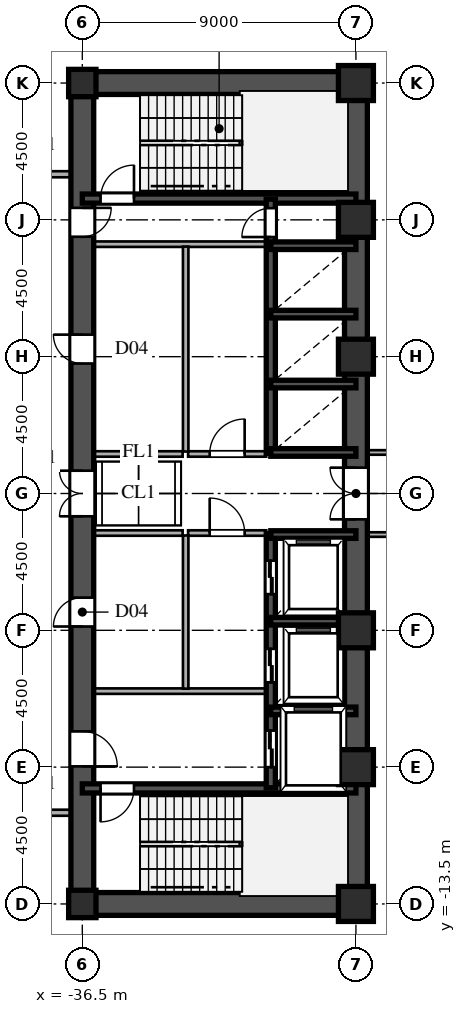
"""IFC4 building model, lengths in metres.
Left out: names, types, materials, properties, quantities, classifications, styles, units other than length and angle.
Written with IfcOpenShell. Run it as: python <this file> out.ifc"""

import sys

from ifc_helpers import new_model, si_unit, direction, frame, frame_2d, origin, origin_2d, place, context, subcontext, project, spatial, rectangle, hollow_rectangle, i_section, extrude, source, transform, mapped, element, fill, save


model = new_model("IFC4")
c1 = context("Model", 3, precision=1e-05, world=origin(), true_north=direction((0.0, 1.0)))
c2 = subcontext(c1, "Body", "Model", "MODEL_VIEW")
j1 = project(units=[si_unit("LENGTHUNIT", "METRE"), si_unit("PLANEANGLEUNIT", "RADIAN")], contexts=[c1])
p1 = place(None, origin())
s1 = spatial("IfcSite", under=j1, at=p1, CompositionType="ELEMENT")
p2 = place(p1, origin())
s2 = spatial("IfcBuilding", under=s1, at=p2, CompositionType="ELEMENT")
p3 = place(p2, frame((0.0, 0.0, 9.9)))
s3 = spatial("IfcBuildingStorey", under=s2, at=p3, CompositionType="ELEMENT", Elevation=9.9)
m1 = source(origin(), c2, "Body", "SweptSolid", [
    extrude(hollow_rectangle(XDim=1.15, YDim=1.15, WallThickness=0.048, at=origin_2d()), origin(), (0.0, 0.0, 1.0), 4.5),
])
for number, where, z_axis, x_axis in (
    (1, (-27.5, -13.5, 0.0), (0.0, 0.0, 1.0), (1.0, 0.0, 0.0)),
    (2, (-27.5, -9.0, 0.0), (0.0, 0.0, 1.0), (1.0, 0.0, 0.0)),
    (3, (-27.5, -4.5, 0.0), (0.0, 0.0, 1.0), (1.0, 0.0, 0.0)),
    (4, (-27.5, 4.5, 0.0), (0.0, 0.0, 1.0), (1.0, 0.0, 0.0)),
    (5, (-27.5, 9.0, 0.0), (0.0, 0.0, 1.0), (1.0, 0.0, 0.0)),
    (6, (-27.5, 13.5, 0.0), (0.0, 0.0, 1.0), (1.0, 0.0, 0.0)),
):
    element("IfcColumn", number, at=place(p3, frame(where, z_axis=z_axis, x_axis=x_axis)), inside=s3, PredefinedType="COLUMN", context=c2, shape_type="MappedRepresentation", body=[
        mapped(m1, transform((0.0, 0.0, 0.0), scale=1.0)),
    ])
m2 = source(origin(), c2, "Body", "SweptSolid", [
    extrude(i_section(OverallWidth=0.9, OverallDepth=0.9, WebThickness=0.036, FlangeThickness=0.055, at=origin_2d()), origin(), (0.0, 0.0, 1.0), 4.5),
])
for number, where, z_axis, x_axis in (
    (7, (-36.5, -13.5, 0.0), (0.0, 0.0, 1.0), (1.0, 0.0, 0.0)),
    (8, (-36.5, 13.5, 0.0), (0.0, 0.0, 1.0), (1.0, 0.0, 0.0)),
):
    element("IfcColumn", number, at=place(p3, frame(where, z_axis=z_axis, x_axis=x_axis)), inside=s3, PredefinedType="COLUMN", context=c2, shape_type="MappedRepresentation", body=[
        mapped(m2, transform((0.0, 0.0, 0.0), scale=1.0)),
    ])
for number, where, z_axis, x_axis in (
    (9, (-27.5, -13.5, 0.0), (0.0, 0.0, 1.0), (0.0, 1.0, 0.0)),
    (10, (-27.5, 1.3, 0.0), (0.0, 0.0, 1.0), (0.0, 1.0, 0.0)),
):
    element("IfcWall", number, at=place(p3, frame(where, z_axis=z_axis, x_axis=x_axis)), inside=s3, PredefinedType="SHEAR", context=c2, shape_type="SweptSolid", body=[
        extrude(rectangle(XDim=12.2, YDim=0.75, at=frame_2d((6.1, 0.0))), origin(), (0.0, 0.0, 1.0), 4.22),
    ])
p4 = place(p3, frame((-27.5, -1.3, 0.0), z_axis=(0.0, 0.0, 1.0), x_axis=(0.0, 1.0, 0.0)))
e11 = element("IfcWall", 11, at=p4, inside=s3, PredefinedType="SHEAR", context=c2, shape_type="SweptSolid", body=[
    extrude(rectangle(XDim=2.6, YDim=0.75, at=frame_2d((1.3, 0.0))), origin(), (0.0, 0.0, 1.0), 4.22),
])
p5 = place(p4, frame((0.45, 0.0, 0.0)))
e12 = element("IfcOpeningElement", 12, at=p5, cuts=e11, PredefinedType="OPENING", context=c2, shape_type="SweptSolid", body=[
    extrude(rectangle(XDim=1.7, YDim=2.35, at=frame_2d((0.85, 1.175))), frame((0.0, 0.385, 0.0), z_axis=(0.0, -1.0, 0.0), x_axis=(1.0, 0.0, 0.0)), (0.0, 0.0, 1.0), 0.77),
])
for number, where, z_axis, x_axis in (
    (13, (-36.5, -13.5, 0.0), (0.0, 0.0, 1.0), (1.0, 0.0, 0.0)),
    (14, (-36.5, 13.5, 0.0), (0.0, 0.0, 1.0), (1.0, 0.0, 0.0)),
):
    element("IfcWall", number, at=place(p3, frame(where, z_axis=z_axis, x_axis=x_axis)), inside=s3, PredefinedType="SHEAR", context=c2, shape_type="SweptSolid", body=[
        extrude(rectangle(XDim=9.0, YDim=0.75, at=frame_2d((4.5, 0.0))), origin(), (0.0, 0.0, 1.0), 4.22),
    ])
p6 = place(p3, frame((-36.5, -13.65, 0.0), z_axis=(0.0, 0.0, 1.0), x_axis=(0.0, 1.0, 0.0)))
e15 = element("IfcWall", 15, at=p6, inside=s3, PredefinedType="SHEAR", context=c2, shape_type="SweptSolid", body=[
    extrude(rectangle(XDim=7.15, YDim=0.75, at=frame_2d((3.575, 0.0))), origin(), (0.0, 0.0, 1.0), 4.22),
])
p7 = place(p6, frame((4.675, 0.0, 0.0)))
e16 = element("IfcOpeningElement", 16, at=p7, cuts=e15, PredefinedType="OPENING", context=c2, shape_type="SweptSolid", body=[
    extrude(rectangle(XDim=1.15, YDim=2.2, at=frame_2d((0.575, 1.1))), frame((0.0, 0.385, 0.0), z_axis=(0.0, -1.0, 0.0), x_axis=(1.0, 0.0, 0.0)), (0.0, 0.0, 1.0), 0.77),
])
p8 = place(p3, frame((-36.5, -1.3, 0.0), z_axis=(0.0, 0.0, 1.0), x_axis=(0.0, 1.0, 0.0)))
e17 = element("IfcWall", 17, at=p8, inside=s3, PredefinedType="SHEAR", context=c2, shape_type="SweptSolid", body=[
    extrude(rectangle(XDim=2.6, YDim=0.75, at=frame_2d((1.3, 0.0))), origin(), (0.0, 0.0, 1.0), 4.22),
])
p9 = place(p8, frame((0.55, 0.0, 0.0)))
e18 = element("IfcOpeningElement", 18, at=p9, cuts=e17, PredefinedType="OPENING", context=c2, shape_type="SweptSolid", body=[
    extrude(rectangle(XDim=1.5, YDim=2.3, at=frame_2d((0.75, 1.15))), frame((0.0, 0.385, 0.0), z_axis=(0.0, -1.0, 0.0), x_axis=(1.0, 0.0, 0.0)), (0.0, 0.0, 1.0), 0.77),
])
p10 = place(p3, frame((-36.5, 8.2, 0.0), z_axis=(0.0, 0.0, 1.0), x_axis=(0.0, 1.0, 0.0)))
e19 = element("IfcWall", 19, at=p10, inside=s3, PredefinedType="SHEAR", context=c2, shape_type="SweptSolid", body=[
    extrude(rectangle(XDim=5.45, YDim=0.75, at=frame_2d((2.725, 0.0))), origin(), (0.0, 0.0, 1.0), 4.22),
])
p11 = place(p10, frame((0.245, 0.0, 0.0)))
e20 = element("IfcOpeningElement", 20, at=p11, cuts=e19, PredefinedType="OPENING", context=c2, shape_type="SweptSolid", body=[
    extrude(rectangle(XDim=0.95, YDim=2.15, at=frame_2d((0.475, 1.075))), frame((0.0, 0.385, 0.0), z_axis=(0.0, -1.0, 0.0), x_axis=(1.0, 0.0, 0.0)), (0.0, 0.0, 1.0), 0.77),
])
p12 = place(p3, frame((-36.5, -6.5, 0.0), z_axis=(0.0, 0.0, 1.0), x_axis=(0.0, 1.0, 0.0)))
e21 = element("IfcWall", 21, at=p12, inside=s3, PredefinedType="SHEAR", context=c2, shape_type="SweptSolid", body=[
    extrude(rectangle(XDim=5.2, YDim=0.75, at=frame_2d((2.6, 0.0))), origin(), (0.0, 0.0, 1.0), 4.22),
])
p13 = place(p12, frame((2.125, 0.0, 0.0)))
e22 = element("IfcOpeningElement", 22, at=p13, cuts=e21, PredefinedType="OPENING", context=c2, shape_type="SweptSolid", body=[
    extrude(rectangle(XDim=0.95, YDim=2.15, at=frame_2d((0.475, 1.075))), frame((0.0, 0.385, 0.0), z_axis=(0.0, -1.0, 0.0), x_axis=(1.0, 0.0, 0.0)), (0.0, 0.0, 1.0), 0.77),
])
p14 = place(p3, frame((-36.5, 1.3, 0.0), z_axis=(0.0, 0.0, 1.0), x_axis=(0.0, 1.0, 0.0)))
e23 = element("IfcWall", 23, at=p14, inside=s3, PredefinedType="SHEAR", context=c2, shape_type="SweptSolid", body=[
    extrude(rectangle(XDim=6.9, YDim=0.75, at=frame_2d((3.45, 0.0))), origin(), (0.0, 0.0, 1.0), 4.22),
])
p15 = place(p14, frame((2.975, 0.0, 0.0)))
e24 = element("IfcOpeningElement", 24, at=p15, cuts=e23, PredefinedType="OPENING", context=c2, shape_type="SweptSolid", body=[
    extrude(rectangle(XDim=0.95, YDim=2.15, at=frame_2d((0.475, 1.075))), frame((0.0, 0.385, 0.0), z_axis=(0.0, -1.0, 0.0), x_axis=(1.0, 0.0, 0.0)), (0.0, 0.0, 1.0), 0.77),
])
p16 = place(p3, frame((-36.5, -9.7, 0.0), z_axis=(0.0, 0.0, 1.0), x_axis=(1.0, 0.0, 0.0)))
e25 = element("IfcWall", 25, at=p16, inside=s3, PredefinedType="SHEAR", context=c2, shape_type="SweptSolid", body=[
    extrude(rectangle(XDim=9.0, YDim=0.3, at=frame_2d((4.5, 0.0))), origin(), (0.0, 0.0, 1.0), 4.22),
])
p17 = place(p16, frame((0.6, 0.0, 0.0)))
e26 = element("IfcOpeningElement", 26, at=p17, cuts=e25, PredefinedType="OPENING", context=c2, shape_type="SweptSolid", body=[
    extrude(rectangle(XDim=1.1, YDim=2.2, at=frame_2d((0.55, 1.1))), frame((0.0, 0.16, 0.0), z_axis=(0.0, -1.0, 0.0), x_axis=(1.0, 0.0, 0.0)), (0.0, 0.0, 1.0), 0.32),
])
p18 = place(p3, frame((-36.5, 9.7, 0.0), z_axis=(0.0, 0.0, 1.0), x_axis=(1.0, 0.0, 0.0)))
e27 = element("IfcWall", 27, at=p18, inside=s3, PredefinedType="SHEAR", context=c2, shape_type="SweptSolid", body=[
    extrude(rectangle(XDim=9.0, YDim=0.3, at=frame_2d((4.5, 0.0))), origin(), (0.0, 0.0, 1.0), 4.22),
])
p19 = place(p18, frame((0.6, 0.0, 0.0)))
e28 = element("IfcOpeningElement", 28, at=p19, cuts=e27, PredefinedType="OPENING", context=c2, shape_type="SweptSolid", body=[
    extrude(rectangle(XDim=1.1, YDim=2.2, at=frame_2d((0.55, 1.1))), frame((0.0, 0.16, 0.0), z_axis=(0.0, -1.0, 0.0), x_axis=(1.0, 0.0, 0.0)), (0.0, 0.0, 1.0), 0.32),
])
for number, where, z_axis, x_axis in (
    (29, (-30.3, -7.15, 0.0), (0.0, 0.0, 1.0), (1.0, 0.0, 0.0)),
    (30, (-30.3, -4.2, 0.0), (0.0, 0.0, 1.0), (1.0, 0.0, 0.0)),
    (31, (-30.3, -1.35, 0.0), (0.0, 0.0, 1.0), (1.0, 0.0, 0.0)),
    (32, (-30.3, 1.35, 0.0), (0.0, 0.0, 1.0), (1.0, 0.0, 0.0)),
    (33, (-30.3, 3.6, 0.0), (0.0, 0.0, 1.0), (1.0, 0.0, 0.0)),
    (34, (-30.3, 5.9, 0.0), (0.0, 0.0, 1.0), (1.0, 0.0, 0.0)),
    (35, (-30.3, 8.15, 0.0), (0.0, 0.0, 1.0), (1.0, 0.0, 0.0)),
):
    element("IfcWall", number, at=place(p3, frame(where, z_axis=z_axis, x_axis=x_axis)), inside=s3, PredefinedType="SHEAR", context=c2, shape_type="SweptSolid", body=[
        extrude(rectangle(XDim=2.8, YDim=0.25, at=frame_2d((1.4, 0.0))), origin(), (0.0, 0.0, 1.0), 4.22),
    ])
p20 = place(p3, frame((-30.3, -9.68, 0.0), z_axis=(0.0, 0.0, 1.0), x_axis=(0.0, 1.0, 0.0)))
e36 = element("IfcWall", 36, at=p20, inside=s3, PredefinedType="SHEAR", context=c2, shape_type="SweptSolid", body=[
    extrude(rectangle(XDim=2.56, YDim=0.3, at=frame_2d((1.28, 0.0))), origin(), (0.0, 0.0, 1.0), 4.22),
])
p21 = place(p20, frame((0.68, 0.0, 0.0)))
e37 = element("IfcOpeningElement", 37, at=p21, cuts=e36, PredefinedType="OPENING", context=c2, shape_type="SweptSolid", body=[
    extrude(rectangle(XDim=1.2, YDim=2.25, at=frame_2d((0.6, 1.125))), frame((0.0, 0.16, 0.0), z_axis=(0.0, -1.0, 0.0), x_axis=(1.0, 0.0, 0.0)), (0.0, 0.0, 1.0), 0.32),
])
p22 = place(p3, frame((-30.3, -7.12, 0.0), z_axis=(0.0, 0.0, 1.0), x_axis=(0.0, 1.0, 0.0)))
e38 = element("IfcWall", 38, at=p22, inside=s3, PredefinedType="SHEAR", context=c2, shape_type="SweptSolid", body=[
    extrude(rectangle(XDim=2.92, YDim=0.3, at=frame_2d((1.46, 0.0))), origin(), (0.0, 0.0, 1.0), 4.22),
])
p23 = place(p22, frame((0.91, 0.0, 0.0)))
e39 = element("IfcOpeningElement", 39, at=p23, cuts=e38, PredefinedType="OPENING", context=c2, shape_type="SweptSolid", body=[
    extrude(rectangle(XDim=1.1, YDim=2.2, at=frame_2d((0.55, 1.1))), frame((0.0, 0.16, 0.0), z_axis=(0.0, -1.0, 0.0), x_axis=(1.0, 0.0, 0.0)), (0.0, 0.0, 1.0), 0.32),
])
p24 = place(p3, frame((-30.3, -4.2, 0.0), z_axis=(0.0, 0.0, 1.0), x_axis=(0.0, 1.0, 0.0)))
e40 = element("IfcWall", 40, at=p24, inside=s3, PredefinedType="SHEAR", context=c2, shape_type="SweptSolid", body=[
    extrude(rectangle(XDim=2.88, YDim=0.3, at=frame_2d((1.44, 0.0))), origin(), (0.0, 0.0, 1.0), 4.22),
])
p25 = place(p24, frame((0.89, 0.0, 0.0)))
e41 = element("IfcOpeningElement", 41, at=p25, cuts=e40, PredefinedType="OPENING", context=c2, shape_type="SweptSolid", body=[
    extrude(rectangle(XDim=1.1, YDim=2.2, at=frame_2d((0.55, 1.1))), frame((0.0, 0.16, 0.0), z_axis=(0.0, -1.0, 0.0), x_axis=(1.0, 0.0, 0.0)), (0.0, 0.0, 1.0), 0.32),
])
p26 = place(p3, frame((-30.3, 1.32, 0.0), z_axis=(0.0, 0.0, 1.0), x_axis=(0.0, 1.0, 0.0)))
e42 = element("IfcWall", 42, at=p26, inside=s3, PredefinedType="SHEAR", context=c2, shape_type="SweptSolid", body=[
    extrude(rectangle(XDim=2.28, YDim=0.3, at=frame_2d((1.14, 0.0))), origin(), (0.0, 0.0, 1.0), 4.22),
])
p27 = place(p3, frame((-30.3, 3.6, 0.0), z_axis=(0.0, 0.0, 1.0), x_axis=(0.0, 1.0, 0.0)))
e43 = element("IfcWall", 43, at=p27, inside=s3, PredefinedType="SHEAR", context=c2, shape_type="SweptSolid", body=[
    extrude(rectangle(XDim=2.3, YDim=0.3, at=frame_2d((1.15, 0.0))), origin(), (0.0, 0.0, 1.0), 4.22),
])
p28 = place(p3, frame((-30.3, 5.9, 0.0), z_axis=(0.0, 0.0, 1.0), x_axis=(0.0, 1.0, 0.0)))
e44 = element("IfcWall", 44, at=p28, inside=s3, PredefinedType="SHEAR", context=c2, shape_type="SweptSolid", body=[
    extrude(rectangle(XDim=2.25, YDim=0.3, at=frame_2d((1.125, 0.0))), origin(), (0.0, 0.0, 1.0), 4.22),
])
p29 = place(p3, frame((-30.3, 8.15, 0.0), z_axis=(0.0, 0.0, 1.0), x_axis=(0.0, 1.0, 0.0)))
e45 = element("IfcWall", 45, at=p29, inside=s3, PredefinedType="SHEAR", context=c2, shape_type="SweptSolid", body=[
    extrude(rectangle(XDim=1.53, YDim=0.3, at=frame_2d((0.765, 0.0))), origin(), (0.0, 0.0, 1.0), 4.22),
])
p30 = place(p29, frame((0.285, 0.0, 0.0)))
e46 = element("IfcOpeningElement", 46, at=p30, cuts=e45, PredefinedType="OPENING", context=c2, shape_type="SweptSolid", body=[
    extrude(rectangle(XDim=0.95, YDim=2.15, at=frame_2d((0.475, 1.075))), frame((0.0, 0.16, 0.0), z_axis=(0.0, -1.0, 0.0), x_axis=(1.0, 0.0, 0.0)), (0.0, 0.0, 1.0), 0.32),
])
for number, where, z_axis, x_axis in (
    (47, (-36.15, -6.5, 0.0), (0.0, 0.0, 1.0), (1.0, 0.0, 0.0)),
    (48, (-36.15, 8.2, 0.0), (0.0, 0.0, 1.0), (1.0, 0.0, 0.0)),
):
    element("IfcWall", number, at=place(p3, frame(where, z_axis=z_axis, x_axis=x_axis)), inside=s3, PredefinedType="PARTITIONING", context=c2, shape_type="SweptSolid", body=[
        extrude(rectangle(XDim=5.7, YDim=0.18, at=frame_2d((2.85, 0.0))), origin(), (0.0, 0.0, 1.0), 4.22),
    ])
p31 = place(p3, frame((-33.1, -6.42, 0.0), z_axis=(0.0, 0.0, 1.0), x_axis=(0.0, 1.0, 0.0)))
e49 = element("IfcWall", 49, at=p31, inside=s3, PredefinedType="PARTITIONING", context=c2, shape_type="SweptSolid", body=[
    extrude(rectangle(XDim=5.04, YDim=0.18, at=frame_2d((2.52, 0.0))), origin(), (0.0, 0.0, 1.0), 4.22),
])
p32 = place(p3, frame((-33.1, 1.38, 0.0), z_axis=(0.0, 0.0, 1.0), x_axis=(0.0, 1.0, 0.0)))
e50 = element("IfcWall", 50, at=p32, inside=s3, PredefinedType="PARTITIONING", context=c2, shape_type="SweptSolid", body=[
    extrude(rectangle(XDim=6.74, YDim=0.18, at=frame_2d((3.37, 0.0))), origin(), (0.0, 0.0, 1.0), 4.22),
])
p33 = place(p3, frame((-33.02, -1.3, 0.0), z_axis=(0.0, 0.0, 1.0), x_axis=(1.0, 0.0, 0.0)))
e51 = element("IfcWall", 51, at=p33, inside=s3, PredefinedType="PARTITIONING", context=c2, shape_type="SweptSolid", body=[
    extrude(rectangle(XDim=2.57, YDim=0.18, at=frame_2d((1.285, 0.0))), origin(), (0.0, 0.0, 1.0), 4.22),
])
p34 = place(p33, frame((0.71, 0.0, 0.0)))
e52 = element("IfcOpeningElement", 52, at=p34, cuts=e51, PredefinedType="OPENING", context=c2, shape_type="SweptSolid", body=[
    extrude(rectangle(XDim=1.15, YDim=2.2, at=frame_2d((0.575, 1.1))), frame((0.0, 0.1, 0.0), z_axis=(0.0, -1.0, 0.0), x_axis=(1.0, 0.0, 0.0)), (0.0, 0.0, 1.0), 0.2),
])
p35 = place(p3, frame((-33.02, 1.3, 0.0), z_axis=(0.0, 0.0, 1.0), x_axis=(1.0, 0.0, 0.0)))
e53 = element("IfcWall", 53, at=p35, inside=s3, PredefinedType="PARTITIONING", context=c2, shape_type="SweptSolid", body=[
    extrude(rectangle(XDim=2.57, YDim=0.18, at=frame_2d((1.285, 0.0))), origin(), (0.0, 0.0, 1.0), 4.22),
])
p36 = place(p35, frame((0.71, 0.0, 0.0)))
e54 = element("IfcOpeningElement", 54, at=p36, cuts=e53, PredefinedType="OPENING", context=c2, shape_type="SweptSolid", body=[
    extrude(rectangle(XDim=1.15, YDim=2.2, at=frame_2d((0.575, 1.1))), frame((0.0, 0.1, 0.0), z_axis=(0.0, -1.0, 0.0), x_axis=(1.0, 0.0, 0.0)), (0.0, 0.0, 1.0), 0.2),
])
for number, where, z_axis, x_axis in (
    (55, (-36.15, -1.3, 0.0), (0.0, 0.0, 1.0), (1.0, 0.0, 0.0)),
    (56, (-36.15, 1.3, 0.0), (0.0, 0.0, 1.0), (1.0, 0.0, 0.0)),
):
    element("IfcWall", number, at=place(p3, frame(where, z_axis=z_axis, x_axis=x_axis)), inside=s3, PredefinedType="PARTITIONING", context=c2, shape_type="SweptSolid", body=[
        extrude(rectangle(XDim=2.95, YDim=0.18, at=frame_2d((1.475, 0.0))), origin(), (0.0, 0.0, 1.0), 4.22),
    ])
p37 = place(p3, frame((-38.915, -10.5, 0.0), z_axis=(0.0, 0.0, 1.0), x_axis=(1.0, 0.0, 0.0)))
e57 = element("IfcWall", 57, at=p37, inside=s3, PredefinedType="PARTITIONING", context=c2, shape_type="SweptSolid", body=[
    extrude(rectangle(XDim=2.035, YDim=0.2, at=frame_2d((1.018, 0.0))), origin(), (0.0, 0.0, 1.0), 4.22),
])
for number, where, z_axis, x_axis in (
    (58, (-27.12, -1.35, 0.0), (0.0, 0.0, 1.0), (1.0, 0.0, 0.0)),
    (59, (-27.12, 1.35, 0.0), (0.0, 0.0, 1.0), (1.0, 0.0, 0.0)),
):
    element("IfcWall", number, at=place(p3, frame(where, z_axis=z_axis, x_axis=x_axis)), inside=s3, PredefinedType="PARTITIONING", context=c2, shape_type="SweptSolid", body=[
        extrude(rectangle(XDim=14.235, YDim=0.15, at=frame_2d((7.118, 0.0))), origin(), (0.0, 0.0, 1.0), 4.22),
    ])
p38 = place(p3, frame((-38.915, 10.5, 0.0), z_axis=(0.0, 0.0, 1.0), x_axis=(1.0, 0.0, 0.0)))
e60 = element("IfcWall", 60, at=p38, inside=s3, PredefinedType="PARTITIONING", context=c2, shape_type="SweptSolid", body=[
    extrude(rectangle(XDim=2.035, YDim=0.2, at=frame_2d((1.018, 0.0))), origin(), (0.0, 0.0, 1.0), 4.22),
])
m3 = source(origin(), c2, "Body", "SweptSolid", [
    extrude(rectangle(XDim=1.7, YDim=2.35, at=frame_2d((0.85, 1.175))), frame((0.0, 0.025, 0.0), z_axis=(0.0, -1.0, 0.0), x_axis=(1.0, 0.0, 0.0)), (0.0, 0.0, 1.0), 0.05),
])
p39 = place(p5, origin())
e61 = element("IfcDoor", 61, at=p39, inside=s3, OperationType="DOUBLE_SWING_LEFT", PredefinedType="DOOR", context=c2, shape_type="MappedRepresentation", body=[
    mapped(m3, transform((0.0, 0.0, 0.0), scale=1.0)),
])
fill(e12, e61)
m4 = source(origin(), c2, "Body", "SweptSolid", [
    extrude(rectangle(XDim=1.15, YDim=2.2, at=frame_2d((0.575, 1.1))), frame((0.0, 0.025, 0.0), z_axis=(0.0, -1.0, 0.0), x_axis=(1.0, 0.0, 0.0)), (0.0, 0.0, 1.0), 0.05),
])
p40 = place(p7, frame((1.15, 0.0, 0.0), z_axis=(0.0, 0.0, 1.0), x_axis=(-1.0, 0.0, 0.0)))
e62 = element("IfcDoor", 62, at=p40, inside=s3, OperationType="SINGLE_SWING_LEFT", PredefinedType="DOOR", context=c2, shape_type="MappedRepresentation", body=[
    mapped(m4, transform((0.0, 0.0, 0.0), scale=1.0)),
])
fill(e16, e62)
m5 = source(origin(), c2, "Body", "SweptSolid", [
    extrude(rectangle(XDim=1.5, YDim=2.3, at=frame_2d((0.75, 1.15))), frame((0.0, 0.025, 0.0), z_axis=(0.0, -1.0, 0.0), x_axis=(1.0, 0.0, 0.0)), (0.0, 0.0, 1.0), 0.05),
])
p41 = place(p9, origin())
e63 = element("IfcDoor", 63, at=p41, inside=s3, OperationType="DOUBLE_SWING_LEFT", PredefinedType="DOOR", context=c2, shape_type="MappedRepresentation", body=[
    mapped(m5, transform((0.0, 0.0, 0.0), scale=1.0)),
])
fill(e18, e63)
m6 = source(origin(), c2, "Body", "SweptSolid", [
    extrude(rectangle(XDim=0.95, YDim=2.15, at=frame_2d((0.475, 1.075))), frame((0.0, 0.025, 0.0), z_axis=(0.0, -1.0, 0.0), x_axis=(1.0, 0.0, 0.0)), (0.0, 0.0, 1.0), 0.05),
])
p42 = place(p11, frame((0.95, 0.0, 0.0), z_axis=(0.0, 0.0, 1.0), x_axis=(-1.0, 0.0, 0.0)))
e64 = element("IfcDoor", 64, at=p42, inside=s3, OperationType="SINGLE_SWING_RIGHT", PredefinedType="DOOR", context=c2, shape_type="MappedRepresentation", body=[
    mapped(m6, transform((0.0, 0.0, 0.0), scale=1.0)),
])
fill(e20, e64)
p43 = place(p13, origin())
e65 = element("IfcDoor", 65, at=p43, inside=s3, OperationType="SINGLE_SWING_LEFT", PredefinedType="DOOR", context=c2, shape_type="MappedRepresentation", body=[
    mapped(m6, transform((0.0, 0.0, 0.0), scale=1.0)),
])
fill(e22, e65)
p44 = place(p15, origin())
e66 = element("IfcDoor", 66, at=p44, inside=s3, OperationType="SINGLE_SWING_RIGHT", PredefinedType="DOOR", context=c2, shape_type="MappedRepresentation", body=[
    mapped(m6, transform((0.0, 0.0, 0.0), scale=1.0)),
])
fill(e24, e66)
m7 = source(origin(), c2, "Body", "SweptSolid", [
    extrude(rectangle(XDim=1.1, YDim=2.2, at=frame_2d((0.55, 1.1))), frame((0.0, 0.025, 0.0), z_axis=(0.0, -1.0, 0.0), x_axis=(1.0, 0.0, 0.0)), (0.0, 0.0, 1.0), 0.05),
])
p45 = place(p17, frame((1.1, 0.0, 0.0), z_axis=(0.0, 0.0, 1.0), x_axis=(-1.0, 0.0, 0.0)))
e67 = element("IfcDoor", 67, at=p45, inside=s3, OperationType="SINGLE_SWING_LEFT", PredefinedType="DOOR", context=c2, shape_type="MappedRepresentation", body=[
    mapped(m7, transform((0.0, 0.0, 0.0), scale=1.0)),
])
fill(e26, e67)
p46 = place(p19, origin())
e68 = element("IfcDoor", 68, at=p46, inside=s3, OperationType="SINGLE_SWING_RIGHT", PredefinedType="DOOR", context=c2, shape_type="MappedRepresentation", body=[
    mapped(m7, transform((0.0, 0.0, 0.0), scale=1.0)),
])
fill(e28, e68)
m8 = source(origin(), c2, "Body", "SweptSolid", [
    extrude(rectangle(XDim=1.2, YDim=2.25, at=frame_2d((0.6, 1.125))), frame((0.0, 0.025, 0.0), z_axis=(0.0, -1.0, 0.0), x_axis=(1.0, 0.0, 0.0)), (0.0, 0.0, 1.0), 0.05),
])
p47 = place(p21, origin())
e69 = element("IfcDoor", 69, at=p47, inside=s3, OperationType="DOUBLE_DOOR_SLIDING", PredefinedType="DOOR", context=c2, shape_type="MappedRepresentation", body=[
    mapped(m8, transform((0.0, 0.0, 0.0), scale=1.0)),
])
fill(e37, e69)
m9 = source(origin(), c2, "Body", "SweptSolid", [
    extrude(rectangle(XDim=1.1, YDim=2.2, at=frame_2d((0.55, 1.1))), frame((0.0, 0.025, 0.0), z_axis=(0.0, -1.0, 0.0), x_axis=(1.0, 0.0, 0.0)), (0.0, 0.0, 1.0), 0.05),
])
p48 = place(p23, origin())
e70 = element("IfcDoor", 70, at=p48, inside=s3, OperationType="DOUBLE_DOOR_SLIDING", PredefinedType="DOOR", context=c2, shape_type="MappedRepresentation", body=[
    mapped(m9, transform((0.0, 0.0, 0.0), scale=1.0)),
])
fill(e39, e70)
p49 = place(p25, origin())
e71 = element("IfcDoor", 71, at=p49, inside=s3, OperationType="DOUBLE_DOOR_SLIDING", PredefinedType="DOOR", context=c2, shape_type="MappedRepresentation", body=[
    mapped(m9, transform((0.0, 0.0, 0.0), scale=1.0)),
])
fill(e41, e71)
p50 = place(p30, origin())
e72 = element("IfcDoor", 72, at=p50, inside=s3, OperationType="SINGLE_SWING_LEFT", PredefinedType="DOOR", context=c2, shape_type="MappedRepresentation", body=[
    mapped(m6, transform((0.0, 0.0, 0.0), scale=1.0)),
])
fill(e46, e72)
p51 = place(p34, origin())
e73 = element("IfcDoor", 73, at=p51, inside=s3, OperationType="SINGLE_SWING_LEFT", PredefinedType="DOOR", context=c2, shape_type="MappedRepresentation", body=[
    mapped(m4, transform((0.0, 0.0, 0.0), scale=1.0)),
])
fill(e52, e73)
p52 = place(p36, origin())
e74 = element("IfcDoor", 74, at=p52, inside=s3, OperationType="SINGLE_SWING_RIGHT", PredefinedType="DOOR", context=c2, shape_type="MappedRepresentation", body=[
    mapped(m4, transform((0.0, 0.0, 0.0), scale=1.0)),
])
fill(e54, e74)
save(model, sys.argv[1])
